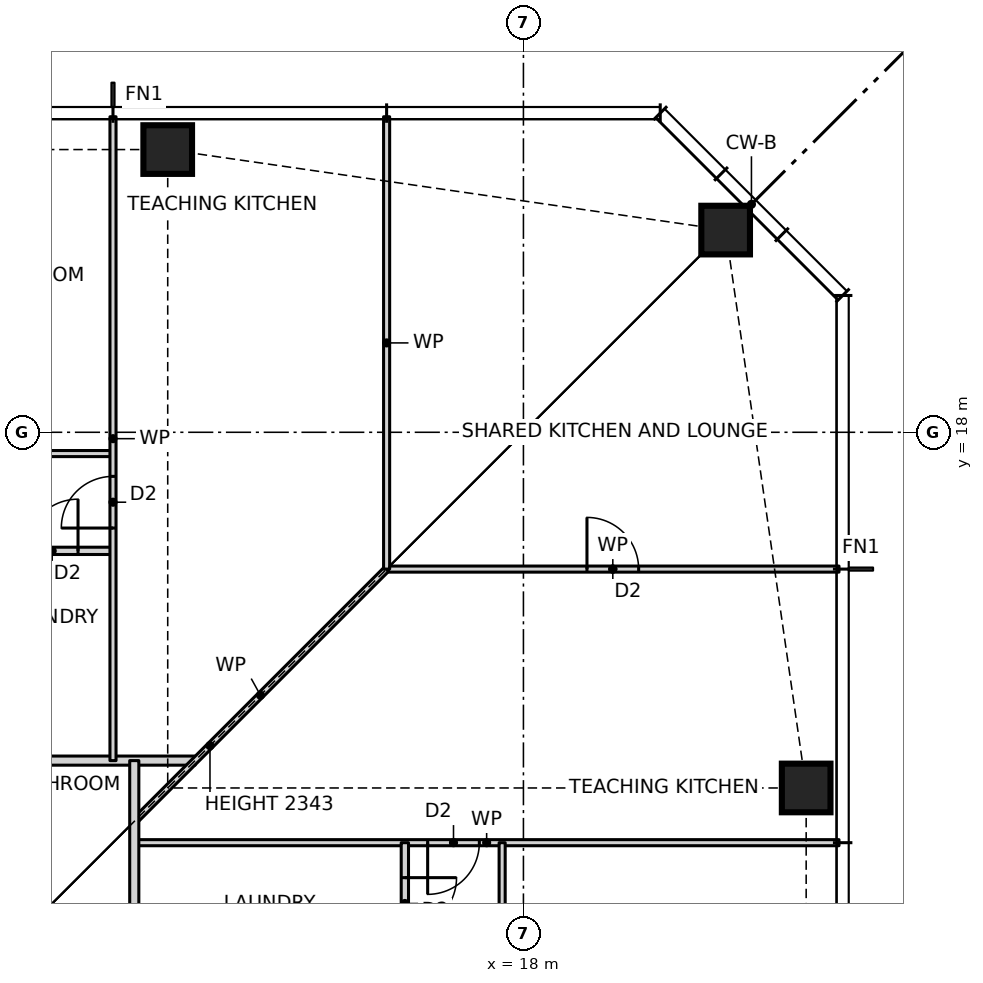
"""IFC4 building model, lengths in metres.
Left out: names, types, materials, properties, quantities, classifications, styles, units other than length and angle.
Written with IfcOpenShell. Run it as: python <this file> out.ifc"""

import sys

from ifc_helpers import new_model, si_unit, direction, frame, frame_2d, origin, origin_2d, place, context, subcontext, project, spatial, rectangle, hollow_rectangle, extrude, element, fill, save


model = new_model("IFC4")
c1 = context("Model", 3, precision=1e-05, world=origin(), true_north=direction((0.0, 1.0)))
c2 = subcontext(c1, "Body", "Model", "MODEL_VIEW")
j1 = project(units=[si_unit("LENGTHUNIT", "METRE"), si_unit("PLANEANGLEUNIT", "RADIAN")], contexts=[c1])
p1 = place(None, origin())
s1 = spatial("IfcSite", under=j1, at=p1, CompositionType="ELEMENT")
p2 = place(p1, origin())
s2 = spatial("IfcBuilding", under=s1, at=p2, CompositionType="ELEMENT")
p3 = place(p2, frame((0.0, 0.0, 64.0)))
s3 = spatial("IfcBuildingStorey", under=s2, at=p3, CompositionType="ELEMENT", Elevation=64.0)
for number, where, z_axis, x_axis in (
    (1, (22.65, 12.15, 0.0), (0.0, 0.0, 1.0), (1.0, 0.0, 0.0)),
    (2, (21.326, 21.326, 0.0), (0.0, 0.0, 1.0), (1.0, 0.0, 0.0)),
    (3, (12.15, 22.65, 0.0), (0.0, 0.0, 1.0), (1.0, 0.0, 0.0)),
):
    element("IfcColumn", number, at=place(p3, frame(where, z_axis=z_axis, x_axis=x_axis)), inside=s3, PredefinedType="COLUMN", context=c2, shape_type="SweptSolid", body=[
        extrude(hollow_rectangle(XDim=0.8, YDim=0.8, WallThickness=0.09, at=origin_2d()), origin(), (0.0, 0.0, 1.0), 3.5),
    ])
p4 = place(p3, frame((11.6, 11.25, 0.0), z_axis=(0.0, 0.0, 1.0), x_axis=(1.0, 0.0, 0.0)))
e4 = element("IfcWall", 4, at=p4, inside=s3, PredefinedType="PARTITIONING", context=c2, shape_type="SweptSolid", body=[
    extrude(rectangle(XDim=11.59, YDim=0.1, at=frame_2d((5.795, 0.0))), origin(), (0.0, 0.0, 1.0), 3.27),
])
p5 = place(p4, frame((4.825, 0.0, 0.0)))
e5 = element("IfcOpeningElement", 5, at=p5, cuts=e4, PredefinedType="OPENING", context=c2, shape_type="SweptSolid", body=[
    extrude(rectangle(XDim=0.85, YDim=2.1, at=frame_2d((0.425, 1.05))), frame((0.0, 0.06, 0.0), z_axis=(0.0, -1.0, 0.0), x_axis=(1.0, 0.0, 0.0)), (0.0, 0.0, 1.0), 0.12),
])
p6 = place(p3, frame((-12.6, 12.6, 0.0), z_axis=(0.0, 0.0, 1.0), x_axis=(1.0, 0.0, 0.0)))
e6 = element("IfcWall", 6, at=p6, inside=s3, PredefinedType="PARTITIONING", context=c2, shape_type="SweptSolid", body=[
    extrude(rectangle(XDim=25.2, YDim=0.15, at=frame_2d((12.6, 0.0))), origin(), (0.0, 0.0, 1.0), 3.27),
])
p7 = place(p6, frame((11.505, 0.0, 0.0)))
e7 = element("IfcOpeningElement", 7, at=p7, cuts=e6, PredefinedType="OPENING", context=c2, shape_type="SweptSolid", body=[
    extrude(rectangle(XDim=1.0, YDim=2.1, at=frame_2d((0.5, 1.05))), frame((0.0, 0.085, 0.0), z_axis=(0.0, -1.0, 0.0), x_axis=(1.0, 0.0, 0.0)), (0.0, 0.0, 1.0), 0.17),
])
p8 = place(p3, frame((15.75, 15.75, 0.0), z_axis=(0.0, 0.0, 1.0), x_axis=(1.0, 0.0, 0.0)))
e8 = element("IfcWall", 8, at=p8, inside=s3, PredefinedType="PARTITIONING", context=c2, shape_type="SweptSolid", body=[
    extrude(rectangle(XDim=7.44, YDim=0.1, at=frame_2d((3.72, 0.0))), origin(), (0.0, 0.0, 1.0), 3.27),
])
p9 = place(p8, frame((3.295, 0.0, 0.0)))
e9 = element("IfcOpeningElement", 9, at=p9, cuts=e8, PredefinedType="OPENING", context=c2, shape_type="SweptSolid", body=[
    extrude(rectangle(XDim=0.85, YDim=2.1, at=frame_2d((0.425, 1.05))), frame((0.0, 0.06, 0.0), z_axis=(0.0, -1.0, 0.0), x_axis=(1.0, 0.0, 0.0)), (0.0, 0.0, 1.0), 0.12),
])
p10 = place(p3, frame((5.65, 16.05, 0.0), z_axis=(0.0, 0.0, 1.0), x_axis=(1.0, 0.0, 0.0)))
e10 = element("IfcWall", 10, at=p10, inside=s3, PredefinedType="PARTITIONING", context=c2, shape_type="SweptSolid", body=[
    extrude(rectangle(XDim=5.6, YDim=0.12, at=frame_2d((2.8, 0.0))), origin(), (0.0, 0.0, 1.0), 3.27),
])
p11 = place(p10, frame((4.175, 0.0, 0.0)))
e11 = element("IfcOpeningElement", 11, at=p11, cuts=e10, PredefinedType="OPENING", context=c2, shape_type="SweptSolid", body=[
    extrude(rectangle(XDim=0.85, YDim=2.1, at=frame_2d((0.425, 1.05))), frame((0.0, 0.07, 0.0), z_axis=(0.0, -1.0, 0.0), x_axis=(1.0, 0.0, 0.0)), (0.0, 0.0, 1.0), 0.14),
])
p12 = place(p10, frame((2.225, 0.0, 0.0)))
e12 = element("IfcOpeningElement", 12, at=p12, cuts=e10, PredefinedType="OPENING", context=c2, shape_type="SweptSolid", body=[
    extrude(rectangle(XDim=0.85, YDim=2.1, at=frame_2d((0.425, 1.05))), frame((0.0, 0.07, 0.0), z_axis=(0.0, -1.0, 0.0), x_axis=(1.0, 0.0, 0.0)), (0.0, 0.0, 1.0), 0.14),
])
p13 = place(p3, frame((-15.75, 17.65, 0.0), z_axis=(0.0, 0.0, 1.0), x_axis=(1.0, 0.0, 0.0)))
e13 = element("IfcWall", 13, at=p13, inside=s3, PredefinedType="PARTITIONING", context=c2, shape_type="SweptSolid", body=[
    extrude(rectangle(XDim=27.0, YDim=0.1, at=frame_2d((13.5, 0.0))), origin(), (0.0, 0.0, 1.0), 3.27),
])
p14 = place(p13, frame((24.3, 0.0, 0.0)))
e14 = element("IfcOpeningElement", 14, at=p14, cuts=e13, PredefinedType="OPENING", context=c2, shape_type="SweptSolid", body=[
    extrude(rectangle(XDim=0.9, YDim=2.1, at=frame_2d((0.45, 1.05))), frame((0.0, 0.06, 0.0), z_axis=(0.0, -1.0, 0.0), x_axis=(1.0, 0.0, 0.0)), (0.0, 0.0, 1.0), 0.12),
])
p15 = place(p13, frame((19.8, 0.0, 0.0)))
e15 = element("IfcOpeningElement", 15, at=p15, cuts=e13, PredefinedType="OPENING", context=c2, shape_type="SweptSolid", body=[
    extrude(rectangle(XDim=0.9, YDim=2.1, at=frame_2d((0.45, 1.05))), frame((0.0, 0.06, 0.0), z_axis=(0.0, -1.0, 0.0), x_axis=(1.0, 0.0, 0.0)), (0.0, 0.0, 1.0), 0.12),
])
p16 = place(p13, frame((15.3, 0.0, 0.0)))
e16 = element("IfcOpeningElement", 16, at=p16, cuts=e13, PredefinedType="OPENING", context=c2, shape_type="SweptSolid", body=[
    extrude(rectangle(XDim=0.9, YDim=2.1, at=frame_2d((0.45, 1.05))), frame((0.0, 0.06, 0.0), z_axis=(0.0, -1.0, 0.0), x_axis=(1.0, 0.0, 0.0)), (0.0, 0.0, 1.0), 0.12),
])
p17 = place(p13, frame((10.8, 0.0, 0.0)))
e17 = element("IfcOpeningElement", 17, at=p17, cuts=e13, PredefinedType="OPENING", context=c2, shape_type="SweptSolid", body=[
    extrude(rectangle(XDim=0.9, YDim=2.1, at=frame_2d((0.45, 1.05))), frame((0.0, 0.06, 0.0), z_axis=(0.0, -1.0, 0.0), x_axis=(1.0, 0.0, 0.0)), (0.0, 0.0, 1.0), 0.12),
])
p18 = place(p13, frame((6.3, 0.0, 0.0)))
e18 = element("IfcOpeningElement", 18, at=p18, cuts=e13, PredefinedType="OPENING", context=c2, shape_type="SweptSolid", body=[
    extrude(rectangle(XDim=0.9, YDim=2.1, at=frame_2d((0.45, 1.05))), frame((0.0, 0.06, 0.0), z_axis=(0.0, -1.0, 0.0), x_axis=(1.0, 0.0, 0.0)), (0.0, 0.0, 1.0), 0.12),
])
p19 = place(p13, frame((1.8, 0.0, 0.0)))
e19 = element("IfcOpeningElement", 19, at=p19, cuts=e13, PredefinedType="OPENING", context=c2, shape_type="SweptSolid", body=[
    extrude(rectangle(XDim=0.9, YDim=2.1, at=frame_2d((0.45, 1.05))), frame((0.0, 0.06, 0.0), z_axis=(0.0, -1.0, 0.0), x_axis=(1.0, 0.0, 0.0)), (0.0, 0.0, 1.0), 0.12),
])
p20 = place(p3, frame((11.6, 11.6, 0.0), z_axis=(0.0, 0.0, 1.0), x_axis=(0.707106781187, 0.707106781187, 0.0)))
e20 = element("IfcWall", 20, at=p20, inside=s3, PredefinedType="PARTITIONING", context=c2, shape_type="SweptSolid", body=[
    extrude(rectangle(XDim=5.869, YDim=0.1, at=frame_2d((2.935, 0.0))), origin(), (0.0, 0.0, 1.0), 2.343),
])
p21 = place(p3, frame((17.65, -15.75, 0.0), z_axis=(0.0, 0.0, 1.0), x_axis=(0.0, 1.0, 0.0)))
e21 = element("IfcWall", 21, at=p21, inside=s3, PredefinedType="PARTITIONING", context=c2, shape_type="SweptSolid", body=[
    extrude(rectangle(XDim=27.0, YDim=0.1, at=frame_2d((13.5, 0.0))), origin(), (0.0, 0.0, 1.0), 3.27),
])
p22 = place(p21, frame((1.8, 0.0, 0.0)))
e22 = element("IfcOpeningElement", 22, at=p22, cuts=e21, PredefinedType="OPENING", context=c2, shape_type="SweptSolid", body=[
    extrude(rectangle(XDim=0.9, YDim=2.1, at=frame_2d((0.45, 1.05))), frame((0.0, 0.06, 0.0), z_axis=(0.0, -1.0, 0.0), x_axis=(1.0, 0.0, 0.0)), (0.0, 0.0, 1.0), 0.12),
])
p23 = place(p21, frame((6.3, 0.0, 0.0)))
e23 = element("IfcOpeningElement", 23, at=p23, cuts=e21, PredefinedType="OPENING", context=c2, shape_type="SweptSolid", body=[
    extrude(rectangle(XDim=0.9, YDim=2.1, at=frame_2d((0.45, 1.05))), frame((0.0, 0.06, 0.0), z_axis=(0.0, -1.0, 0.0), x_axis=(1.0, 0.0, 0.0)), (0.0, 0.0, 1.0), 0.12),
])
p24 = place(p21, frame((10.8, 0.0, 0.0)))
e24 = element("IfcOpeningElement", 24, at=p24, cuts=e21, PredefinedType="OPENING", context=c2, shape_type="SweptSolid", body=[
    extrude(rectangle(XDim=0.9, YDim=2.1, at=frame_2d((0.45, 1.05))), frame((0.0, 0.06, 0.0), z_axis=(0.0, -1.0, 0.0), x_axis=(1.0, 0.0, 0.0)), (0.0, 0.0, 1.0), 0.12),
])
p25 = place(p21, frame((15.3, 0.0, 0.0)))
e25 = element("IfcOpeningElement", 25, at=p25, cuts=e21, PredefinedType="OPENING", context=c2, shape_type="SweptSolid", body=[
    extrude(rectangle(XDim=0.9, YDim=2.1, at=frame_2d((0.45, 1.05))), frame((0.0, 0.06, 0.0), z_axis=(0.0, -1.0, 0.0), x_axis=(1.0, 0.0, 0.0)), (0.0, 0.0, 1.0), 0.12),
])
p26 = place(p21, frame((19.8, 0.0, 0.0)))
e26 = element("IfcOpeningElement", 26, at=p26, cuts=e21, PredefinedType="OPENING", context=c2, shape_type="SweptSolid", body=[
    extrude(rectangle(XDim=0.9, YDim=2.1, at=frame_2d((0.45, 1.05))), frame((0.0, 0.06, 0.0), z_axis=(0.0, -1.0, 0.0), x_axis=(1.0, 0.0, 0.0)), (0.0, 0.0, 1.0), 0.12),
])
p27 = place(p21, frame((24.3, 0.0, 0.0)))
e27 = element("IfcOpeningElement", 27, at=p27, cuts=e21, PredefinedType="OPENING", context=c2, shape_type="SweptSolid", body=[
    extrude(rectangle(XDim=0.9, YDim=2.1, at=frame_2d((0.45, 1.05))), frame((0.0, 0.06, 0.0), z_axis=(0.0, -1.0, 0.0), x_axis=(1.0, 0.0, 0.0)), (0.0, 0.0, 1.0), 0.12),
])
p28 = place(p3, frame((16.05, 4.35, 0.0), z_axis=(0.0, 0.0, 1.0), x_axis=(0.0, 1.0, 0.0)))
e28 = element("IfcWall", 28, at=p28, inside=s3, PredefinedType="PARTITIONING", context=c2, shape_type="SweptSolid", body=[
    extrude(rectangle(XDim=6.9, YDim=0.12, at=frame_2d((3.45, 0.0))), origin(), (0.0, 0.0, 1.0), 3.27),
])
p29 = place(p28, frame((2.125, 0.0, 0.0)))
e29 = element("IfcOpeningElement", 29, at=p29, cuts=e28, PredefinedType="OPENING", context=c2, shape_type="SweptSolid", body=[
    extrude(rectangle(XDim=0.85, YDim=2.1, at=frame_2d((0.425, 1.05))), frame((0.0, 0.07, 0.0), z_axis=(0.0, -1.0, 0.0), x_axis=(1.0, 0.0, 0.0)), (0.0, 0.0, 1.0), 0.14),
])
p30 = place(p28, frame((3.675, 0.0, 0.0)))
e30 = element("IfcOpeningElement", 30, at=p30, cuts=e28, PredefinedType="OPENING", context=c2, shape_type="SweptSolid", body=[
    extrude(rectangle(XDim=0.85, YDim=2.1, at=frame_2d((0.425, 1.05))), frame((0.0, 0.07, 0.0), z_axis=(0.0, -1.0, 0.0), x_axis=(1.0, 0.0, 0.0)), (0.0, 0.0, 1.0), 0.14),
])
p31 = place(p28, frame((5.475, 0.0, 0.0)))
e31 = element("IfcOpeningElement", 31, at=p31, cuts=e28, PredefinedType="OPENING", context=c2, shape_type="SweptSolid", body=[
    extrude(rectangle(XDim=0.85, YDim=2.1, at=frame_2d((0.425, 1.05))), frame((0.0, 0.07, 0.0), z_axis=(0.0, -1.0, 0.0), x_axis=(1.0, 0.0, 0.0)), (0.0, 0.0, 1.0), 0.14),
])
p32 = place(p3, frame((15.75, 15.75, 0.0), z_axis=(0.0, 0.0, 1.0), x_axis=(0.0, 1.0, 0.0)))
e32 = element("IfcWall", 32, at=p32, inside=s3, PredefinedType="PARTITIONING", context=c2, shape_type="SweptSolid", body=[
    extrude(rectangle(XDim=7.44, YDim=0.1, at=frame_2d((3.72, 0.0))), origin(), (0.0, 0.0, 1.0), 3.27),
])
p33 = place(p3, frame((11.6, -11.6, 0.0), z_axis=(0.0, 0.0, 1.0), x_axis=(0.0, 1.0, 0.0)))
e33 = element("IfcWall", 33, at=p33, inside=s3, PredefinedType="PARTITIONING", context=c2, shape_type="SweptSolid", body=[
    extrude(rectangle(XDim=24.2, YDim=0.15, at=frame_2d((12.1, 0.0))), origin(), (0.0, 0.0, 1.0), 3.27),
])
p34 = place(p33, frame((14.25, 0.0, 0.0)))
e34 = element("IfcOpeningElement", 34, at=p34, cuts=e33, PredefinedType="OPENING", context=c2, shape_type="SweptSolid", body=[
    extrude(rectangle(XDim=1.0, YDim=2.1, at=frame_2d((0.5, 1.05))), frame((0.0, 0.085, 0.0), z_axis=(0.0, -1.0, 0.0), x_axis=(1.0, 0.0, 0.0)), (0.0, 0.0, 1.0), 0.17),
])
p35 = place(p33, frame((16.4, 0.0, 0.0)))
e35 = element("IfcOpeningElement", 35, at=p35, cuts=e33, PredefinedType="OPENING", context=c2, shape_type="SweptSolid", body=[
    extrude(rectangle(XDim=0.9, YDim=2.1, at=frame_2d((0.45, 1.05))), frame((0.0, 0.085, 0.0), z_axis=(0.0, -1.0, 0.0), x_axis=(1.0, 0.0, 0.0)), (0.0, 0.0, 1.0), 0.17),
])
p36 = place(p3, frame((11.25, 12.6, 0.0), z_axis=(0.0, 0.0, 1.0), x_axis=(0.0, 1.0, 0.0)))
e36 = element("IfcWall", 36, at=p36, inside=s3, PredefinedType="PARTITIONING", context=c2, shape_type="SweptSolid", body=[
    extrude(rectangle(XDim=10.59, YDim=0.1, at=frame_2d((5.295, 0.0))), origin(), (0.0, 0.0, 1.0), 3.27),
])
p37 = place(p36, frame((3.825, 0.0, 0.0)))
e37 = element("IfcOpeningElement", 37, at=p37, cuts=e36, PredefinedType="OPENING", context=c2, shape_type="SweptSolid", body=[
    extrude(rectangle(XDim=0.85, YDim=2.1, at=frame_2d((0.425, 1.05))), frame((0.0, 0.06, 0.0), z_axis=(0.0, -1.0, 0.0), x_axis=(1.0, 0.0, 0.0)), (0.0, 0.0, 1.0), 0.12),
])
p38 = place(p31, frame((0.85, 0.0, 0.0), z_axis=(0.0, 0.0, 1.0), x_axis=(-1.0, 0.0, 0.0)))
e38 = element("IfcDoor", 38, at=p38, inside=s3, OperationType="SINGLE_SWING_LEFT", PredefinedType="DOOR", context=c2, shape_type="SweptSolid", body=[
    extrude(rectangle(XDim=0.85, YDim=2.1, at=frame_2d((0.425, 1.05))), frame((0.0, 0.025, 0.0), z_axis=(0.0, -1.0, 0.0), x_axis=(1.0, 0.0, 0.0)), (0.0, 0.0, 1.0), 0.05),
])
fill(e31, e38)
p39 = place(p5, frame((0.85, 0.0, 0.0), z_axis=(0.0, 0.0, 1.0), x_axis=(-1.0, 0.0, 0.0)))
e39 = element("IfcDoor", 39, at=p39, inside=s3, OperationType="SINGLE_SWING_RIGHT", PredefinedType="DOOR", context=c2, shape_type="SweptSolid", body=[
    extrude(rectangle(XDim=0.85, YDim=2.1, at=frame_2d((0.425, 1.05))), frame((0.0, 0.025, 0.0), z_axis=(0.0, -1.0, 0.0), x_axis=(1.0, 0.0, 0.0)), (0.0, 0.0, 1.0), 0.05),
])
fill(e5, e39)
p40 = place(p37, origin())
e40 = element("IfcDoor", 40, at=p40, inside=s3, OperationType="SINGLE_SWING_LEFT", PredefinedType="DOOR", context=c2, shape_type="SweptSolid", body=[
    extrude(rectangle(XDim=0.85, YDim=2.1, at=frame_2d((0.425, 1.05))), frame((0.0, 0.025, 0.0), z_axis=(0.0, -1.0, 0.0), x_axis=(1.0, 0.0, 0.0)), (0.0, 0.0, 1.0), 0.05),
])
fill(e37, e40)
p41 = place(p11, origin())
e41 = element("IfcDoor", 41, at=p41, inside=s3, OperationType="SINGLE_SWING_RIGHT", PredefinedType="DOOR", context=c2, shape_type="SweptSolid", body=[
    extrude(rectangle(XDim=0.85, YDim=2.1, at=frame_2d((0.425, 1.05))), frame((0.0, 0.025, 0.0), z_axis=(0.0, -1.0, 0.0), x_axis=(1.0, 0.0, 0.0)), (0.0, 0.0, 1.0), 0.05),
])
fill(e11, e41)
p42 = place(p9, origin())
e42 = element("IfcDoor", 42, at=p42, inside=s3, OperationType="SINGLE_SWING_LEFT", PredefinedType="DOOR", context=c2, shape_type="SweptSolid", body=[
    extrude(rectangle(XDim=0.85, YDim=2.1, at=frame_2d((0.425, 1.05))), frame((0.0, 0.025, 0.0), z_axis=(0.0, -1.0, 0.0), x_axis=(1.0, 0.0, 0.0)), (0.0, 0.0, 1.0), 0.05),
])
fill(e9, e42)
save(model, sys.argv[1])
